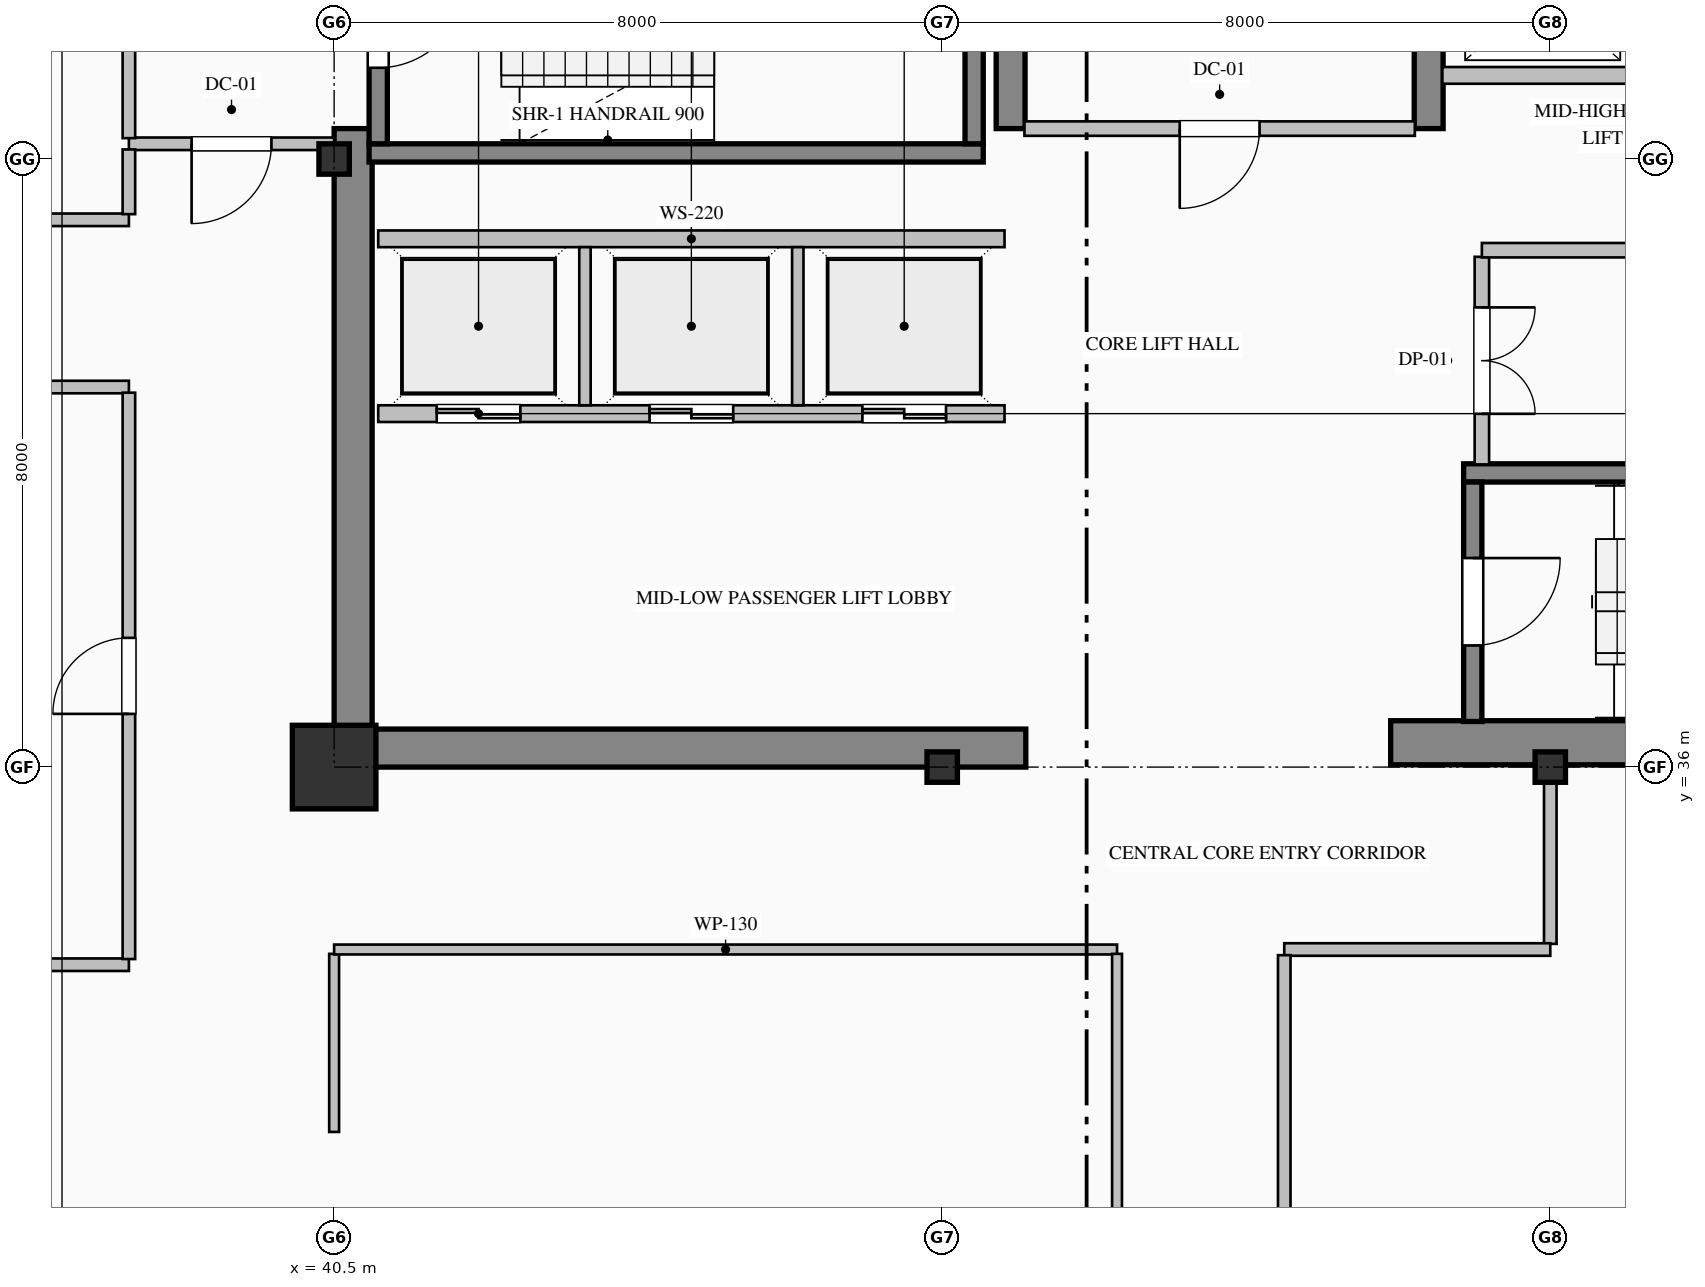
"""IFC4 building model, lengths in metres.
Left out: names, types, materials, properties, quantities, classifications, styles, units other than length and angle.
Written with IfcOpenShell. Run it as: python <this file> out.ifc"""

import sys

from ifc_helpers import new_model, si_unit, direction, frame, frame_2d, origin, origin_2d, place, context, subcontext, project, spatial, rectangle, hollow_rectangle, i_section, extrude, element, fill, save


model = new_model("IFC4")
c1 = context("Model", 3, precision=1e-05, world=origin(), true_north=direction((0.0, 1.0)))
c2 = subcontext(c1, "Body", "Model", "MODEL_VIEW")
j1 = project(units=[si_unit("LENGTHUNIT", "METRE"), si_unit("PLANEANGLEUNIT", "RADIAN")], contexts=[c1])
p1 = place(None, origin())
s1 = spatial("IfcSite", under=j1, at=p1, CompositionType="ELEMENT")
p2 = place(p1, origin())
s2 = spatial("IfcBuilding", under=s1, at=p2, CompositionType="ELEMENT")
p3 = place(p2, frame((0.0, 0.0, 143.0)))
s3 = spatial("IfcBuildingStorey", under=s2, at=p3, CompositionType="ELEMENT", Elevation=143.0)
p4 = place(p3, frame((40.75, 36.5, 0.0), z_axis=(0.0, 0.0, 1.0), x_axis=(0.0, 1.0, 0.0)))
e1 = element("IfcWall", 1, at=p4, inside=s3, PredefinedType="SHEAR", context=c2, shape_type="SweptSolid", body=[
    extrude(rectangle(XDim=7.9, YDim=0.5, at=frame_2d((3.95, 0.0))), origin(), (0.0, 0.0, 1.0), 3.765),
])
p5 = place(p3, frame((40.5, 36.25, 0.0), z_axis=(0.0, 0.0, 1.0), x_axis=(1.0, 0.0, 0.0)))
e2 = element("IfcWall", 2, at=p5, inside=s3, PredefinedType="SHEAR", context=c2, shape_type="SweptSolid", body=[
    extrude(rectangle(XDim=9.1, YDim=0.5, at=frame_2d((4.55, 0.0))), origin(), (0.0, 0.0, 1.0), 3.765),
])
p6 = place(p3, frame((54.4, 36.32, 0.0), z_axis=(0.0, 0.0, 1.0), x_axis=(1.0, 0.0, 0.0)))
e3 = element("IfcWall", 3, at=p6, inside=s3, PredefinedType="SHEAR", context=c2, shape_type="SweptSolid", body=[
    extrude(rectangle(XDim=9.6, YDim=0.58, at=frame_2d((4.8, 0.0))), origin(), (0.0, 0.0, 1.0), 4.0),
])
p7 = place(p3, frame((49.4, 44.4, 0.0), z_axis=(0.0, 0.0, 1.0), x_axis=(0.0, 1.0, 0.0)))
e4 = element("IfcWall", 4, at=p7, inside=s3, PredefinedType="SHEAR", context=c2, shape_type="SweptSolid", body=[
    extrude(rectangle(XDim=3.0, YDim=0.38, at=frame_2d((1.5, 0.0))), origin(), (0.0, 0.0, 1.0), 3.765),
])
p8 = place(p3, frame((54.9, 44.4, 0.0), z_axis=(0.0, 0.0, 1.0), x_axis=(0.0, 1.0, 0.0)))
e5 = element("IfcWall", 5, at=p8, inside=s3, PredefinedType="SHEAR", context=c2, shape_type="SweptSolid", body=[
    extrude(rectangle(XDim=7.1, YDim=0.38, at=frame_2d((3.55, 0.0))), origin(), (0.0, 0.0, 1.0), 3.765),
])
p9 = place(p3, frame((40.5, 36.0, 0.0), z_axis=(0.0, 0.0, 1.0), x_axis=(1.0, 0.0, 0.0)))
e6 = element("IfcColumn", 6, at=p9, inside=s3, PredefinedType="COLUMN", context=c2, shape_type="SweptSolid", body=[
    extrude(hollow_rectangle(XDim=1.1, YDim=1.1, WallThickness=0.04, at=origin_2d()), origin(), (0.0, 0.0, 1.0), 4.0),
])
for number, where, z_axis, x_axis in (
    (7, (40.5, 44.0, 0.0), (0.0, 0.0, 1.0), (1.0, 0.0, 0.0)),
    (8, (48.5, 36.0, 0.0), (0.0, 0.0, 1.0), (1.0, 0.0, 0.0)),
    (9, (56.5, 36.0, 0.0), (0.0, 0.0, 1.0), (1.0, 0.0, 0.0)),
):
    element("IfcColumn", number, at=place(p3, frame(where, z_axis=z_axis, x_axis=x_axis)), inside=s3, PredefinedType="COLUMN", context=c2, shape_type="SweptSolid", body=[
        extrude(i_section(OverallWidth=0.4, OverallDepth=0.4, WebThickness=0.013, FlangeThickness=0.021, FilletRadius=0.022, at=origin_2d()), origin(), (0.0, 0.0, 1.0), 4.0),
    ])
p10 = place(p3, frame((49.04, 44.08, 0.0), z_axis=(0.0, 0.0, 1.0), x_axis=(-1.0, 0.0, 0.0)))
e10 = element("IfcWall", 10, at=p10, inside=s3, PredefinedType="SOLIDWALL", context=c2, shape_type="SweptSolid", body=[
    extrude(rectangle(XDim=8.08, YDim=0.24, at=frame_2d((4.04, 0.0))), origin(), (0.0, 0.0, 1.0), 4.0),
])
p11 = place(p3, frame((41.08, 47.35, 0.0), z_axis=(0.0, 0.0, 1.0), x_axis=(0.0, -1.0, 0.0)))
e11 = element("IfcWall", 11, at=p11, inside=s3, PredefinedType="SOLIDWALL", context=c2, shape_type="SweptSolid", body=[
    extrude(rectangle(XDim=3.15, YDim=0.24, at=frame_2d((1.575, 0.0))), origin(), (0.0, 0.0, 1.0), 4.0),
])
p12 = place(p11, frame((1.0, 0.0, 0.0)))
e12 = element("IfcOpeningElement", 12, at=p12, cuts=e11, PredefinedType="OPENING", context=c2, shape_type="SweptSolid", body=[
    extrude(rectangle(XDim=1.15, YDim=2.2, at=frame_2d((0.575, 1.1))), frame((0.0, 0.13, 0.0), z_axis=(0.0, -1.0, 0.0), x_axis=(1.0, 0.0, 0.0)), (0.0, 0.0, 1.0), 0.26),
])
p13 = place(p3, frame((48.92, 44.2, 0.0), z_axis=(0.0, 0.0, 1.0), x_axis=(0.0, 1.0, 0.0)))
e13 = element("IfcWall", 13, at=p13, inside=s3, PredefinedType="SOLIDWALL", context=c2, shape_type="SweptSolid", body=[
    extrude(rectangle(XDim=3.15, YDim=0.24, at=frame_2d((1.575, 0.0))), origin(), (0.0, 0.0, 1.0), 4.0),
])
p14 = place(p3, frame((55.36, 39.87, 0.0), z_axis=(0.0, 0.0, 1.0), x_axis=(1.0, 0.0, 0.0)))
e14 = element("IfcWall", 14, at=p14, inside=s3, PredefinedType="SOLIDWALL", context=c2, shape_type="SweptSolid", body=[
    extrude(rectangle(XDim=8.08, YDim=0.24, at=frame_2d((4.04, 0.0))), origin(), (0.0, 0.0, 1.0), 4.0),
])
p15 = place(p3, frame((55.48, 39.75, 0.0), z_axis=(0.0, 0.0, 1.0), x_axis=(0.0, -1.0, 0.0)))
e15 = element("IfcWall", 15, at=p15, inside=s3, PredefinedType="SOLIDWALL", context=c2, shape_type="SweptSolid", body=[
    extrude(rectangle(XDim=3.15, YDim=0.24, at=frame_2d((1.575, 0.0))), origin(), (0.0, 0.0, 1.0), 4.0),
])
p16 = place(p15, frame((1.0, 0.0, 0.0)))
e16 = element("IfcOpeningElement", 16, at=p16, cuts=e15, PredefinedType="OPENING", context=c2, shape_type="SweptSolid", body=[
    extrude(rectangle(XDim=1.15, YDim=2.2, at=frame_2d((0.575, 1.1))), frame((0.0, 0.13, 0.0), z_axis=(0.0, -1.0, 0.0), x_axis=(1.0, 0.0, 0.0)), (0.0, 0.0, 1.0), 0.26),
])
p17 = place(p3, frame((49.32, 40.65, 0.0), z_axis=(0.0, 0.0, 1.0), x_axis=(-1.0, 0.0, 0.0)))
e17 = element("IfcWall", 17, at=p17, inside=s3, PredefinedType="PARTITIONING", context=c2, shape_type="SweptSolid", body=[
    extrude(rectangle(XDim=8.24, YDim=0.22, at=frame_2d((4.12, 0.0))), origin(), (0.0, 0.0, 1.0), 3.765),
])
p18 = place(p17, frame((6.37, 0.0, 0.0)))
e18 = element("IfcOpeningElement", 18, at=p18, cuts=e17, PredefinedType="OPENING", context=c2, shape_type="SweptSolid", body=[
    extrude(rectangle(XDim=1.1, YDim=2.2, at=frame_2d((0.55, 1.1))), frame((0.0, 0.12, 0.0), z_axis=(0.0, -1.0, 0.0), x_axis=(1.0, 0.0, 0.0)), (0.0, 0.0, 1.0), 0.24),
])
p19 = place(p17, frame((3.57, 0.0, 0.0)))
e19 = element("IfcOpeningElement", 19, at=p19, cuts=e17, PredefinedType="OPENING", context=c2, shape_type="SweptSolid", body=[
    extrude(rectangle(XDim=1.1, YDim=2.2, at=frame_2d((0.55, 1.1))), frame((0.0, 0.12, 0.0), z_axis=(0.0, -1.0, 0.0), x_axis=(1.0, 0.0, 0.0)), (0.0, 0.0, 1.0), 0.24),
])
p20 = place(p17, frame((0.77, 0.0, 0.0)))
e20 = element("IfcOpeningElement", 20, at=p20, cuts=e17, PredefinedType="OPENING", context=c2, shape_type="SweptSolid", body=[
    extrude(rectangle(XDim=1.1, YDim=2.2, at=frame_2d((0.55, 1.1))), frame((0.0, 0.12, 0.0), z_axis=(0.0, -1.0, 0.0), x_axis=(1.0, 0.0, 0.0)), (0.0, 0.0, 1.0), 0.24),
])
p21 = place(p3, frame((41.08, 42.95, 0.0), z_axis=(0.0, 0.0, 1.0), x_axis=(1.0, 0.0, 0.0)))
e21 = element("IfcWall", 21, at=p21, inside=s3, PredefinedType="PARTITIONING", context=c2, shape_type="SweptSolid", body=[
    extrude(rectangle(XDim=8.24, YDim=0.22, at=frame_2d((4.12, 0.0))), origin(), (0.0, 0.0, 1.0), 3.765),
])
for number, where, z_axis, x_axis in (
    (22, (43.8, 40.76, 0.0), (0.0, 0.0, 1.0), (0.0, 1.0, 0.0)),
    (23, (46.6, 40.76, 0.0), (0.0, 0.0, 1.0), (0.0, 1.0, 0.0)),
):
    element("IfcWall", number, at=place(p3, frame(where, z_axis=z_axis, x_axis=x_axis)), inside=s3, PredefinedType="PARTITIONING", context=c2, shape_type="SweptSolid", body=[
        extrude(rectangle(XDim=2.08, YDim=0.15, at=frame_2d((1.04, 0.0))), origin(), (0.0, 0.0, 1.0), 3.765),
    ])
p22 = place(p3, frame((63.32, 45.1, 0.0), z_axis=(0.0, 0.0, 1.0), x_axis=(-1.0, 0.0, 0.0)))
e24 = element("IfcWall", 24, at=p22, inside=s3, PredefinedType="PARTITIONING", context=c2, shape_type="SweptSolid", body=[
    extrude(rectangle(XDim=8.24, YDim=0.22, at=frame_2d((4.12, 0.0))), origin(), (0.0, 0.0, 1.0), 3.765),
])
p23 = place(p3, frame((40.5, 44.2, 0.0), z_axis=(0.0, 0.0, 1.0), x_axis=(-1.0, 0.0, 0.0)))
e25 = element("IfcWall", 25, at=p23, inside=s3, PredefinedType="PARTITIONING", context=c2, shape_type="SweptSolid", body=[
    extrude(rectangle(XDim=2.7, YDim=0.165, at=frame_2d((1.35, 0.0))), origin(), (0.0, 0.0, 1.0), 3.765),
])
p24 = place(p23, frame((0.825, 0.0, 0.0)))
e26 = element("IfcOpeningElement", 26, at=p24, cuts=e25, PredefinedType="OPENING", context=c2, shape_type="SweptSolid", body=[
    extrude(rectangle(XDim=1.05, YDim=2.15, at=frame_2d((0.525, 1.075))), frame((0.0, 0.093, 0.0), z_axis=(0.0, -1.0, 0.0), x_axis=(1.0, 0.0, 0.0)), (0.0, 0.0, 1.0), 0.185),
])
p25 = place(p3, frame((37.8, 44.274, 0.0), z_axis=(0.0, 0.0, 1.0), x_axis=(0.0, 1.0, 0.0)))
e27 = element("IfcWall", 27, at=p25, inside=s3, PredefinedType="PARTITIONING", context=c2, shape_type="SweptSolid", body=[
    extrude(rectangle(XDim=3.051, YDim=0.165, at=frame_2d((1.525, 0.0))), origin(), (0.0, 0.0, 1.0), 3.765),
])
p26 = place(p3, frame((54.718, 44.4, 0.0), z_axis=(0.0, 0.0, 1.0), x_axis=(-1.0, 0.0, 0.0)))
e28 = element("IfcWall", 28, at=p26, inside=s3, PredefinedType="PARTITIONING", context=c2, shape_type="SweptSolid", body=[
    extrude(rectangle(XDim=5.136, YDim=0.19, at=frame_2d((2.568, 0.0))), origin(), (0.0, 0.0, 1.0), 3.765),
])
p27 = place(p26, frame((2.043, 0.0, 0.0)))
e29 = element("IfcOpeningElement", 29, at=p27, cuts=e28, PredefinedType="OPENING", context=c2, shape_type="SweptSolid", body=[
    extrude(rectangle(XDim=1.05, YDim=2.15, at=frame_2d((0.525, 1.075))), frame((0.0, 0.105, 0.0), z_axis=(0.0, -1.0, 0.0), x_axis=(1.0, 0.0, 0.0)), (0.0, 0.0, 1.0), 0.21),
])
p28 = place(p3, frame((55.6, 42.713, 0.0), z_axis=(0.0, 0.0, 1.0), x_axis=(0.0, -1.0, 0.0)))
e30 = element("IfcWall", 30, at=p28, inside=s3, PredefinedType="PARTITIONING", context=c2, shape_type="SweptSolid", body=[
    extrude(rectangle(XDim=2.731, YDim=0.19, at=frame_2d((1.365, 0.0))), origin(), (0.0, 0.0, 1.0), 3.765),
])
p29 = place(p28, frame((0.666, 0.0, 0.0)))
e31 = element("IfcOpeningElement", 31, at=p29, cuts=e30, PredefinedType="OPENING", context=c2, shape_type="SweptSolid", body=[
    extrude(rectangle(XDim=1.4, YDim=2.25, at=frame_2d((0.7, 1.125))), frame((0.0, 0.105, 0.0), z_axis=(0.0, -1.0, 0.0), x_axis=(1.0, 0.0, 0.0)), (0.0, 0.0, 1.0), 0.21),
])
p30 = place(p3, frame((58.2, 42.8, 0.0), z_axis=(0.0, 0.0, 1.0), x_axis=(-1.0, 0.0, 0.0)))
e32 = element("IfcWall", 32, at=p30, inside=s3, PredefinedType="PARTITIONING", context=c2, shape_type="SweptSolid", body=[
    extrude(rectangle(XDim=2.6, YDim=0.19, at=frame_2d((1.3, 0.0))), origin(), (0.0, 0.0, 1.0), 3.765),
])
p31 = place(p3, frame((31.0, 33.4, 0.0), z_axis=(0.0, 0.0, 1.0), x_axis=(1.0, 0.0, 0.0)))
e33 = element("IfcWall", 33, at=p31, inside=s3, PredefinedType="PARTITIONING", context=c2, shape_type="SweptSolid", body=[
    extrude(rectangle(XDim=6.8, YDim=0.165, at=frame_2d((3.4, 0.0))), origin(), (0.0, 0.0, 1.0), 3.765),
])
p32 = place(p3, frame((24.5, 43.2, 0.0), z_axis=(0.0, 0.0, 1.0), x_axis=(1.0, 0.0, 0.0)))
e34 = element("IfcWall", 34, at=p32, inside=s3, PredefinedType="PARTITIONING", context=c2, shape_type="SweptSolid", body=[
    extrude(rectangle(XDim=13.3, YDim=0.165, at=frame_2d((6.65, 0.0))), origin(), (0.0, 0.0, 1.0), 3.765),
])
p33 = place(p32, frame((6.2, 0.0, 0.0)))
e35 = element("IfcOpeningElement", 35, at=p33, cuts=e34, PredefinedType="OPENING", context=c2, shape_type="SweptSolid", body=[
    extrude(rectangle(XDim=0.9, YDim=2.15, at=frame_2d((0.45, 1.075))), frame((0.0, 0.093, 0.0), z_axis=(0.0, -1.0, 0.0), x_axis=(1.0, 0.0, 0.0)), (0.0, 0.0, 1.0), 0.185),
])
p34 = place(p3, frame((37.8, 41.0, 0.0), z_axis=(0.0, 0.0, 1.0), x_axis=(-1.0, 0.0, 0.0)))
e36 = element("IfcWall", 36, at=p34, inside=s3, PredefinedType="PARTITIONING", context=c2, shape_type="SweptSolid", body=[
    extrude(rectangle(XDim=6.8, YDim=0.165, at=frame_2d((3.4, 0.0))), origin(), (0.0, 0.0, 1.0), 3.765),
])
p35 = place(p3, frame((37.8, 43.274, 0.0), z_axis=(0.0, 0.0, 1.0), x_axis=(0.0, 1.0, 0.0)))
e37 = element("IfcWall", 37, at=p35, inside=s3, PredefinedType="PARTITIONING", context=c2, shape_type="SweptSolid", body=[
    extrude(rectangle(XDim=0.851, YDim=0.165, at=frame_2d((0.426, 0.0))), origin(), (0.0, 0.0, 1.0), 3.765),
])
p36 = place(p3, frame((37.8, 33.475, 0.0), z_axis=(0.0, 0.0, 1.0), x_axis=(0.0, 1.0, 0.0)))
e38 = element("IfcWall", 38, at=p36, inside=s3, PredefinedType="PARTITIONING", context=c2, shape_type="SweptSolid", body=[
    extrude(rectangle(XDim=7.451, YDim=0.165, at=frame_2d((3.726, 0.0))), origin(), (0.0, 0.0, 1.0), 3.765),
])
p37 = place(p36, frame((3.226, 0.0, 0.0)))
e39 = element("IfcOpeningElement", 39, at=p37, cuts=e38, PredefinedType="OPENING", context=c2, shape_type="SweptSolid", body=[
    extrude(rectangle(XDim=1.0, YDim=2.15, at=frame_2d((0.5, 1.075))), frame((0.0, 0.093, 0.0), z_axis=(0.0, -1.0, 0.0), x_axis=(1.0, 0.0, 0.0)), (0.0, 0.0, 1.0), 0.185),
])
p38 = place(p3, frame((40.5, 33.543, 0.0), z_axis=(0.0, 0.0, 1.0), x_axis=(0.0, -1.0, 0.0)))
e40 = element("IfcWall", 40, at=p38, inside=s3, PredefinedType="PARTITIONING", context=c2, shape_type="SweptSolid", body=[
    extrude(rectangle(XDim=2.343, YDim=0.13, at=frame_2d((1.171, 0.0))), origin(), (0.0, 0.0, 1.0), 3.157),
])
p39 = place(p3, frame((56.5, 36.0, 0.0), z_axis=(0.0, 0.0, 1.0), x_axis=(0.0, -1.0, 0.0)))
e41 = element("IfcWall", 41, at=p39, inside=s3, PredefinedType="PARTITIONING", context=c2, shape_type="SweptSolid", body=[
    extrude(rectangle(XDim=2.325, YDim=0.165, at=frame_2d((1.163, 0.0))), origin(), (0.0, 0.0, 1.0), 3.157),
])
p40 = place(p3, frame((56.5, 33.6, 0.0), z_axis=(0.0, 0.0, 1.0), x_axis=(-1.0, 0.0, 0.0)))
e42 = element("IfcWall", 42, at=p40, inside=s3, PredefinedType="PARTITIONING", context=c2, shape_type="SweptSolid", body=[
    extrude(rectangle(XDim=3.5, YDim=0.165, at=frame_2d((1.75, 0.0))), origin(), (0.0, 0.0, 1.0), 3.765),
])
p41 = place(p3, frame((50.8, 33.6, 0.0), z_axis=(0.0, 0.0, 1.0), x_axis=(-1.0, 0.0, 0.0)))
e43 = element("IfcWall", 43, at=p41, inside=s3, PredefinedType="PARTITIONING", context=c2, shape_type="SweptSolid", body=[
    extrude(rectangle(XDim=10.3, YDim=0.13, at=frame_2d((5.15, 0.0))), origin(), (0.0, 0.0, 1.0), 3.765),
])
p42 = place(p3, frame((53.0, 33.525, 0.0), z_axis=(0.0, 0.0, 1.0), x_axis=(0.0, -1.0, 0.0)))
e44 = element("IfcWall", 44, at=p42, inside=s3, PredefinedType="PARTITIONING", context=c2, shape_type="SweptSolid", body=[
    extrude(rectangle(XDim=11.461, YDim=0.165, at=frame_2d((5.73, 0.0))), origin(), (0.0, 0.0, 1.0), 3.765),
])
p43 = place(p42, frame((5.23, 0.0, 0.0)))
e45 = element("IfcOpeningElement", 45, at=p43, cuts=e44, PredefinedType="OPENING", context=c2, shape_type="SweptSolid", body=[
    extrude(rectangle(XDim=1.0, YDim=2.15, at=frame_2d((0.5, 1.075))), frame((0.0, 0.093, 0.0), z_axis=(0.0, -1.0, 0.0), x_axis=(1.0, 0.0, 0.0)), (0.0, 0.0, 1.0), 0.185),
])
p44 = place(p3, frame((50.8, 14.7, 0.0), z_axis=(0.0, 0.0, 1.0), x_axis=(0.0, 1.0, 0.0)))
e46 = element("IfcWall", 46, at=p44, inside=s3, PredefinedType="PARTITIONING", context=c2, shape_type="SweptSolid", body=[
    extrude(rectangle(XDim=18.843, YDim=0.13, at=frame_2d((9.421, 0.0))), origin(), (0.0, 0.0, 1.0), 3.765),
])
p45 = place(p44, frame((8.921, 0.0, 0.0)))
e47 = element("IfcOpeningElement", 47, at=p45, cuts=e46, PredefinedType="OPENING", context=c2, shape_type="SweptSolid", body=[
    extrude(rectangle(XDim=1.0, YDim=2.15, at=frame_2d((0.5, 1.075))), frame((0.0, 0.075, 0.0), z_axis=(0.0, -1.0, 0.0), x_axis=(1.0, 0.0, 0.0)), (0.0, 0.0, 1.0), 0.15),
])
p46 = place(p12, origin())
e48 = element("IfcDoor", 48, at=p46, inside=s3, OperationType="SINGLE_SWING_LEFT", PredefinedType="DOOR", context=c2, shape_type="SweptSolid", body=[
    extrude(rectangle(XDim=1.15, YDim=2.2, at=frame_2d((0.575, 1.1))), frame((0.0, 0.025, 0.0), z_axis=(0.0, -1.0, 0.0), x_axis=(1.0, 0.0, 0.0)), (0.0, 0.0, 1.0), 0.05),
])
fill(e12, e48)
p47 = place(p16, origin())
e49 = element("IfcDoor", 49, at=p47, inside=s3, OperationType="SINGLE_SWING_LEFT", PredefinedType="DOOR", context=c2, shape_type="SweptSolid", body=[
    extrude(rectangle(XDim=1.15, YDim=2.2, at=frame_2d((0.575, 1.1))), frame((0.0, 0.025, 0.0), z_axis=(0.0, -1.0, 0.0), x_axis=(1.0, 0.0, 0.0)), (0.0, 0.0, 1.0), 0.05),
])
fill(e16, e49)
p48 = place(p18, origin())
e50 = element("IfcDoor", 50, at=p48, inside=s3, OperationType="DOUBLE_DOOR_SLIDING", PredefinedType="DOOR", context=c2, shape_type="SweptSolid", body=[
    extrude(rectangle(XDim=1.1, YDim=2.2, at=frame_2d((0.55, 1.1))), frame((0.0, 0.025, 0.0), z_axis=(0.0, -1.0, 0.0), x_axis=(1.0, 0.0, 0.0)), (0.0, 0.0, 1.0), 0.05),
])
fill(e18, e50)
p49 = place(p19, origin())
e51 = element("IfcDoor", 51, at=p49, inside=s3, OperationType="DOUBLE_DOOR_SLIDING", PredefinedType="DOOR", context=c2, shape_type="SweptSolid", body=[
    extrude(rectangle(XDim=1.1, YDim=2.2, at=frame_2d((0.55, 1.1))), frame((0.0, 0.025, 0.0), z_axis=(0.0, -1.0, 0.0), x_axis=(1.0, 0.0, 0.0)), (0.0, 0.0, 1.0), 0.05),
])
fill(e19, e51)
p50 = place(p20, origin())
e52 = element("IfcDoor", 52, at=p50, inside=s3, OperationType="DOUBLE_DOOR_SLIDING", PredefinedType="DOOR", context=c2, shape_type="SweptSolid", body=[
    extrude(rectangle(XDim=1.1, YDim=2.2, at=frame_2d((0.55, 1.1))), frame((0.0, 0.025, 0.0), z_axis=(0.0, -1.0, 0.0), x_axis=(1.0, 0.0, 0.0)), (0.0, 0.0, 1.0), 0.05),
])
fill(e20, e52)
p51 = place(p27, origin())
e53 = element("IfcDoor", 53, at=p51, inside=s3, OperationType="SINGLE_SWING_RIGHT", PredefinedType="DOOR", context=c2, shape_type="SweptSolid", body=[
    extrude(rectangle(XDim=1.05, YDim=2.15, at=frame_2d((0.525, 1.075))), frame((0.0, 0.025, 0.0), z_axis=(0.0, -1.0, 0.0), x_axis=(1.0, 0.0, 0.0)), (0.0, 0.0, 1.0), 0.05),
])
fill(e29, e53)
p52 = place(p24, origin())
e54 = element("IfcDoor", 54, at=p52, inside=s3, OperationType="SINGLE_SWING_RIGHT", PredefinedType="DOOR", context=c2, shape_type="SweptSolid", body=[
    extrude(rectangle(XDim=1.05, YDim=2.15, at=frame_2d((0.525, 1.075))), frame((0.0, 0.025, 0.0), z_axis=(0.0, -1.0, 0.0), x_axis=(1.0, 0.0, 0.0)), (0.0, 0.0, 1.0), 0.05),
])
fill(e26, e54)
p53 = place(p29, origin())
e55 = element("IfcDoor", 55, at=p53, inside=s3, OperationType="DOUBLE_DOOR_SINGLE_SWING", PredefinedType="DOOR", context=c2, shape_type="SweptSolid", body=[
    extrude(rectangle(XDim=1.4, YDim=2.25, at=frame_2d((0.7, 1.125))), frame((0.0, 0.025, 0.0), z_axis=(0.0, -1.0, 0.0), x_axis=(1.0, 0.0, 0.0)), (0.0, 0.0, 1.0), 0.05),
])
fill(e31, e55)
p54 = place(p37, origin())
e56 = element("IfcDoor", 56, at=p54, inside=s3, OperationType="SINGLE_SWING_LEFT", PredefinedType="DOOR", context=c2, shape_type="SweptSolid", body=[
    extrude(rectangle(XDim=1.0, YDim=2.15, at=frame_2d((0.5, 1.075))), frame((0.0, 0.025, 0.0), z_axis=(0.0, -1.0, 0.0), x_axis=(1.0, 0.0, 0.0)), (0.0, 0.0, 1.0), 0.05),
])
fill(e39, e56)
save(model, sys.argv[1])
